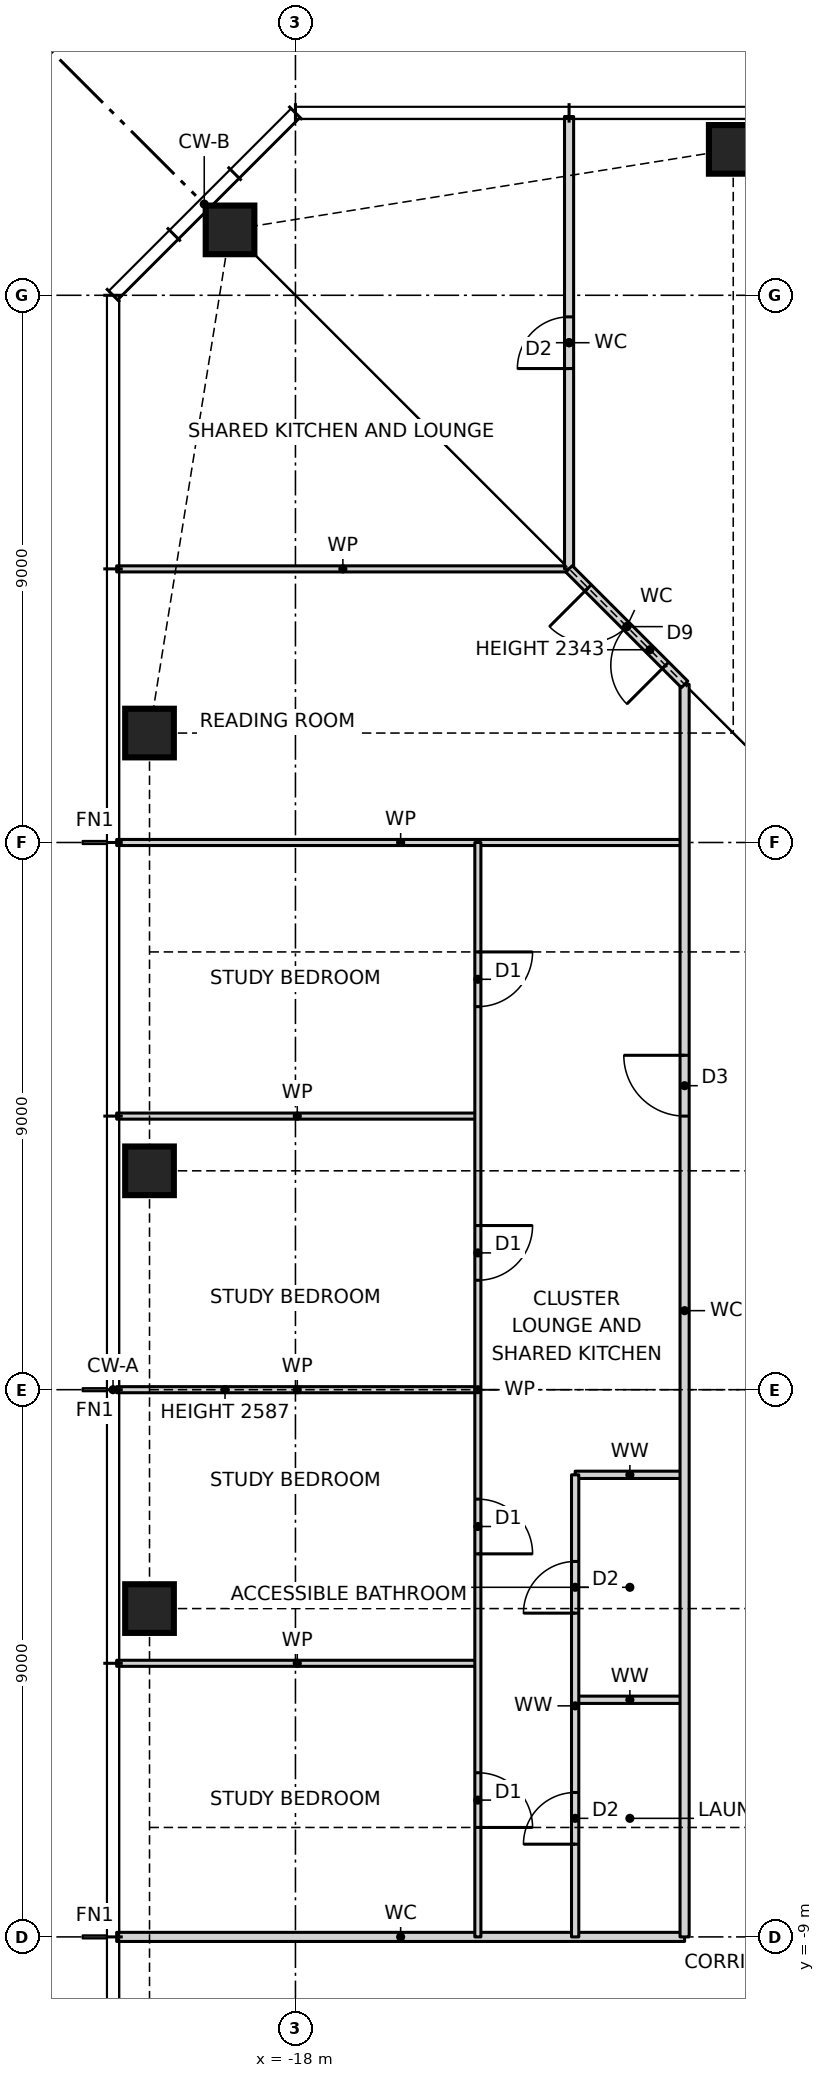
"""IFC4 building model, lengths in metres.
Left out: names, types, materials, properties, quantities, classifications, styles, units other than length and angle.
Written with IfcOpenShell. Run it as: python <this file> out.ifc"""

import sys

from ifc_helpers import new_model, si_unit, direction, frame, frame_2d, origin, origin_2d, place, context, subcontext, project, spatial, rectangle, hollow_rectangle, extrude, element, fill, save


model = new_model("IFC4")
c1 = context("Model", 3, precision=1e-05, world=origin(), true_north=direction((0.0, 1.0)))
c2 = subcontext(c1, "Body", "Model", "MODEL_VIEW")
j1 = project(units=[si_unit("LENGTHUNIT", "METRE"), si_unit("PLANEANGLEUNIT", "RADIAN")], contexts=[c1])
p1 = place(None, origin())
s1 = spatial("IfcSite", under=j1, at=p1, CompositionType="ELEMENT")
p2 = place(p1, origin())
s2 = spatial("IfcBuilding", under=s1, at=p2, CompositionType="ELEMENT")
p3 = place(p2, frame((0.0, 0.0, 136.5)))
s3 = spatial("IfcBuildingStorey", under=s2, at=p3, CompositionType="ELEMENT", Elevation=136.5)
for number, where, z_axis, x_axis in (
    (1, (-10.8, 20.4, 0.0), (0.0, 0.0, 1.0), (1.0, 0.0, 0.0)),
    (2, (-19.076, 19.076, 0.0), (0.0, 0.0, 1.0), (1.0, 0.0, 0.0)),
    (3, (-20.4, 10.8, 0.0), (0.0, 0.0, 1.0), (1.0, 0.0, 0.0)),
    (4, (-20.4, 3.6, 0.0), (0.0, 0.0, 1.0), (1.0, 0.0, 0.0)),
    (5, (-20.4, -3.6, 0.0), (0.0, 0.0, 1.0), (1.0, 0.0, 0.0)),
):
    element("IfcColumn", number, at=place(p3, frame(where, z_axis=z_axis, x_axis=x_axis)), inside=s3, PredefinedType="COLUMN", context=c2, shape_type="SweptSolid", body=[
        extrude(hollow_rectangle(XDim=0.8, YDim=0.8, WallThickness=0.07, at=origin_2d()), origin(), (0.0, 0.0, 1.0), 3.5),
    ])
p4 = place(p3, frame((-20.94, -9.0, 0.0), z_axis=(0.0, 0.0, 1.0), x_axis=(1.0, 0.0, 0.0)))
e6 = element("IfcWall", 6, at=p4, inside=s3, PredefinedType="PARTITIONING", context=c2, shape_type="SweptSolid", body=[
    extrude(rectangle(XDim=9.34, YDim=0.15, at=frame_2d((4.67, 0.0))), origin(), (0.0, 0.0, 1.0), 3.27),
])
p5 = place(p3, frame((-13.4, -5.1, 0.0), z_axis=(0.0, 0.0, 1.0), x_axis=(1.0, 0.0, 0.0)))
e7 = element("IfcWall", 7, at=p5, inside=s3, PredefinedType="PARTITIONING", context=c2, shape_type="SweptSolid", body=[
    extrude(rectangle(XDim=1.8, YDim=0.12, at=frame_2d((0.9, 0.0))), origin(), (0.0, 0.0, 1.0), 3.27),
])
p6 = place(p3, frame((-20.94, -4.5, 0.0), z_axis=(0.0, 0.0, 1.0), x_axis=(1.0, 0.0, 0.0)))
e8 = element("IfcWall", 8, at=p6, inside=s3, PredefinedType="PARTITIONING", context=c2, shape_type="SweptSolid", body=[
    extrude(rectangle(XDim=5.94, YDim=0.1, at=frame_2d((2.97, 0.0))), origin(), (0.0, 0.0, 1.0), 3.27),
])
p7 = place(p3, frame((-13.4, -1.4, 0.0), z_axis=(0.0, 0.0, 1.0), x_axis=(1.0, 0.0, 0.0)))
e9 = element("IfcWall", 9, at=p7, inside=s3, PredefinedType="PARTITIONING", context=c2, shape_type="SweptSolid", body=[
    extrude(rectangle(XDim=1.8, YDim=0.12, at=frame_2d((0.9, 0.0))), origin(), (0.0, 0.0, 1.0), 3.27),
])
p8 = place(p3, frame((-20.94, 0.0, 0.0), z_axis=(0.0, 0.0, 1.0), x_axis=(1.0, 0.0, 0.0)))
e10 = element("IfcWall", 10, at=p8, inside=s3, PredefinedType="PARTITIONING", context=c2, shape_type="SweptSolid", body=[
    extrude(rectangle(XDim=5.94, YDim=0.1, at=frame_2d((2.97, 0.0))), origin(), (0.0, 0.0, 1.0), 2.587),
])
p9 = place(p3, frame((-20.94, 4.5, 0.0), z_axis=(0.0, 0.0, 1.0), x_axis=(1.0, 0.0, 0.0)))
e11 = element("IfcWall", 11, at=p9, inside=s3, PredefinedType="PARTITIONING", context=c2, shape_type="SweptSolid", body=[
    extrude(rectangle(XDim=5.94, YDim=0.1, at=frame_2d((2.97, 0.0))), origin(), (0.0, 0.0, 1.0), 3.27),
])
p10 = place(p3, frame((-20.94, 9.0, 0.0), z_axis=(0.0, 0.0, 1.0), x_axis=(1.0, 0.0, 0.0)))
e12 = element("IfcWall", 12, at=p10, inside=s3, PredefinedType="PARTITIONING", context=c2, shape_type="SweptSolid", body=[
    extrude(rectangle(XDim=9.34, YDim=0.1, at=frame_2d((4.67, 0.0))), origin(), (0.0, 0.0, 1.0), 3.27),
])
p11 = place(p3, frame((-20.94, 13.5, 0.0), z_axis=(0.0, 0.0, 1.0), x_axis=(1.0, 0.0, 0.0)))
e13 = element("IfcWall", 13, at=p11, inside=s3, PredefinedType="PARTITIONING", context=c2, shape_type="SweptSolid", body=[
    extrude(rectangle(XDim=7.44, YDim=0.1, at=frame_2d((3.72, 0.0))), origin(), (0.0, 0.0, 1.0), 3.27),
])
p12 = place(p3, frame((-11.6, -9.0, 0.0), z_axis=(0.0, 0.0, 1.0), x_axis=(0.0, 1.0, 0.0)))
e14 = element("IfcWall", 14, at=p12, inside=s3, PredefinedType="PARTITIONING", context=c2, shape_type="SweptSolid", body=[
    extrude(rectangle(XDim=20.6, YDim=0.15, at=frame_2d((10.3, 0.0))), origin(), (0.0, 0.0, 1.0), 3.27),
])
p13 = place(p12, frame((13.5, 0.0, 0.0)))
e15 = element("IfcOpeningElement", 15, at=p13, cuts=e14, PredefinedType="OPENING", context=c2, shape_type="SweptSolid", body=[
    extrude(rectangle(XDim=1.0, YDim=2.1, at=frame_2d((0.5, 1.05))), frame((0.0, 0.085, 0.0), z_axis=(0.0, -1.0, 0.0), x_axis=(1.0, 0.0, 0.0)), (0.0, 0.0, 1.0), 0.17),
])
p14 = place(p3, frame((-13.4, -9.0, 0.0), z_axis=(0.0, 0.0, 1.0), x_axis=(0.0, 1.0, 0.0)))
e16 = element("IfcWall", 16, at=p14, inside=s3, PredefinedType="PARTITIONING", context=c2, shape_type="SweptSolid", body=[
    extrude(rectangle(XDim=7.6, YDim=0.12, at=frame_2d((3.8, 0.0))), origin(), (0.0, 0.0, 1.0), 3.27),
])
p15 = place(p14, frame((5.325, 0.0, 0.0)))
e17 = element("IfcOpeningElement", 17, at=p15, cuts=e16, PredefinedType="OPENING", context=c2, shape_type="SweptSolid", body=[
    extrude(rectangle(XDim=0.85, YDim=2.1, at=frame_2d((0.425, 1.05))), frame((0.0, 0.07, 0.0), z_axis=(0.0, -1.0, 0.0), x_axis=(1.0, 0.0, 0.0)), (0.0, 0.0, 1.0), 0.14),
])
p16 = place(p14, frame((1.525, 0.0, 0.0)))
e18 = element("IfcOpeningElement", 18, at=p16, cuts=e16, PredefinedType="OPENING", context=c2, shape_type="SweptSolid", body=[
    extrude(rectangle(XDim=0.85, YDim=2.1, at=frame_2d((0.425, 1.05))), frame((0.0, 0.07, 0.0), z_axis=(0.0, -1.0, 0.0), x_axis=(1.0, 0.0, 0.0)), (0.0, 0.0, 1.0), 0.14),
])
p17 = place(p3, frame((-13.5, 13.5, 0.0), z_axis=(0.0, 0.0, 1.0), x_axis=(0.0, 1.0, 0.0)))
e19 = element("IfcWall", 19, at=p17, inside=s3, PredefinedType="PARTITIONING", context=c2, shape_type="SweptSolid", body=[
    extrude(rectangle(XDim=7.44, YDim=0.15, at=frame_2d((3.72, 0.0))), origin(), (0.0, 0.0, 1.0), 3.27),
])
p18 = place(p17, frame((3.295, 0.0, 0.0)))
e20 = element("IfcOpeningElement", 20, at=p18, cuts=e19, PredefinedType="OPENING", context=c2, shape_type="SweptSolid", body=[
    extrude(rectangle(XDim=0.85, YDim=2.1, at=frame_2d((0.425, 1.05))), frame((0.0, 0.085, 0.0), z_axis=(0.0, -1.0, 0.0), x_axis=(1.0, 0.0, 0.0)), (0.0, 0.0, 1.0), 0.17),
])
p19 = place(p3, frame((-15.0, -9.0, 0.0), z_axis=(0.0, 0.0, 1.0), x_axis=(0.0, 1.0, 0.0)))
e21 = element("IfcWall", 21, at=p19, inside=s3, PredefinedType="PARTITIONING", context=c2, shape_type="SweptSolid", body=[
    extrude(rectangle(XDim=18.0, YDim=0.1, at=frame_2d((9.0, 0.0))), origin(), (0.0, 0.0, 1.0), 3.27),
])
p20 = place(p19, frame((15.3, 0.0, 0.0)))
e22 = element("IfcOpeningElement", 22, at=p20, cuts=e21, PredefinedType="OPENING", context=c2, shape_type="SweptSolid", body=[
    extrude(rectangle(XDim=0.9, YDim=2.1, at=frame_2d((0.45, 1.05))), frame((0.0, 0.06, 0.0), z_axis=(0.0, -1.0, 0.0), x_axis=(1.0, 0.0, 0.0)), (0.0, 0.0, 1.0), 0.12),
])
p21 = place(p19, frame((10.8, 0.0, 0.0)))
e23 = element("IfcOpeningElement", 23, at=p21, cuts=e21, PredefinedType="OPENING", context=c2, shape_type="SweptSolid", body=[
    extrude(rectangle(XDim=0.9, YDim=2.1, at=frame_2d((0.45, 1.05))), frame((0.0, 0.06, 0.0), z_axis=(0.0, -1.0, 0.0), x_axis=(1.0, 0.0, 0.0)), (0.0, 0.0, 1.0), 0.12),
])
p22 = place(p19, frame((6.3, 0.0, 0.0)))
e24 = element("IfcOpeningElement", 24, at=p22, cuts=e21, PredefinedType="OPENING", context=c2, shape_type="SweptSolid", body=[
    extrude(rectangle(XDim=0.9, YDim=2.1, at=frame_2d((0.45, 1.05))), frame((0.0, 0.06, 0.0), z_axis=(0.0, -1.0, 0.0), x_axis=(1.0, 0.0, 0.0)), (0.0, 0.0, 1.0), 0.12),
])
p23 = place(p19, frame((1.8, 0.0, 0.0)))
e25 = element("IfcOpeningElement", 25, at=p23, cuts=e21, PredefinedType="OPENING", context=c2, shape_type="SweptSolid", body=[
    extrude(rectangle(XDim=0.9, YDim=2.1, at=frame_2d((0.45, 1.05))), frame((0.0, 0.06, 0.0), z_axis=(0.0, -1.0, 0.0), x_axis=(1.0, 0.0, 0.0)), (0.0, 0.0, 1.0), 0.12),
])
p24 = place(p3, frame((-11.6, 11.6, 0.0), z_axis=(0.0, 0.0, 1.0), x_axis=(-0.707106781187, 0.707106781187, 0.0)))
e26 = element("IfcWall", 26, at=p24, inside=s3, PredefinedType="PARTITIONING", context=c2, shape_type="SweptSolid", body=[
    extrude(rectangle(XDim=2.687, YDim=0.15, at=frame_2d((1.343, 0.0))), origin(), (0.0, 0.0, 1.0), 2.343),
])
p25 = place(p24, frame((0.444, 0.0, 0.0)))
e27 = element("IfcOpeningElement", 27, at=p25, cuts=e26, PredefinedType="OPENING", context=c2, shape_type="SweptSolid", body=[
    extrude(rectangle(XDim=1.8, YDim=2.1, at=frame_2d((0.9, 1.05))), frame((0.0, 0.085, 0.0), z_axis=(0.0, -1.0, 0.0), x_axis=(1.0, 0.0, 0.0)), (0.0, 0.0, 1.0), 0.17),
])
p26 = place(p25, origin())
e28 = element("IfcDoor", 28, at=p26, inside=s3, OperationType="DOUBLE_DOOR_SINGLE_SWING", PredefinedType="DOOR", context=c2, shape_type="SweptSolid", body=[
    extrude(rectangle(XDim=1.8, YDim=2.1, at=frame_2d((0.9, 1.05))), frame((0.0, 0.025, 0.0), z_axis=(0.0, -1.0, 0.0), x_axis=(1.0, 0.0, 0.0)), (0.0, 0.0, 1.0), 0.05),
])
fill(e27, e28)
p27 = place(p20, frame((0.9, 0.0, 0.0), z_axis=(0.0, 0.0, 1.0), x_axis=(-1.0, 0.0, 0.0)))
e29 = element("IfcDoor", 29, at=p27, inside=s3, OperationType="SINGLE_SWING_LEFT", PredefinedType="DOOR", context=c2, shape_type="SweptSolid", body=[
    extrude(rectangle(XDim=0.9, YDim=2.1, at=frame_2d((0.45, 1.05))), frame((0.0, 0.025, 0.0), z_axis=(0.0, -1.0, 0.0), x_axis=(1.0, 0.0, 0.0)), (0.0, 0.0, 1.0), 0.05),
])
fill(e22, e29)
p28 = place(p21, frame((0.9, 0.0, 0.0), z_axis=(0.0, 0.0, 1.0), x_axis=(-1.0, 0.0, 0.0)))
e30 = element("IfcDoor", 30, at=p28, inside=s3, OperationType="SINGLE_SWING_LEFT", PredefinedType="DOOR", context=c2, shape_type="SweptSolid", body=[
    extrude(rectangle(XDim=0.9, YDim=2.1, at=frame_2d((0.45, 1.05))), frame((0.0, 0.025, 0.0), z_axis=(0.0, -1.0, 0.0), x_axis=(1.0, 0.0, 0.0)), (0.0, 0.0, 1.0), 0.05),
])
fill(e23, e30)
p29 = place(p22, frame((0.9, 0.0, 0.0), z_axis=(0.0, 0.0, 1.0), x_axis=(-1.0, 0.0, 0.0)))
e31 = element("IfcDoor", 31, at=p29, inside=s3, OperationType="SINGLE_SWING_RIGHT", PredefinedType="DOOR", context=c2, shape_type="SweptSolid", body=[
    extrude(rectangle(XDim=0.9, YDim=2.1, at=frame_2d((0.45, 1.05))), frame((0.0, 0.025, 0.0), z_axis=(0.0, -1.0, 0.0), x_axis=(1.0, 0.0, 0.0)), (0.0, 0.0, 1.0), 0.05),
])
fill(e24, e31)
p30 = place(p23, frame((0.9, 0.0, 0.0), z_axis=(0.0, 0.0, 1.0), x_axis=(-1.0, 0.0, 0.0)))
e32 = element("IfcDoor", 32, at=p30, inside=s3, OperationType="SINGLE_SWING_RIGHT", PredefinedType="DOOR", context=c2, shape_type="SweptSolid", body=[
    extrude(rectangle(XDim=0.9, YDim=2.1, at=frame_2d((0.45, 1.05))), frame((0.0, 0.025, 0.0), z_axis=(0.0, -1.0, 0.0), x_axis=(1.0, 0.0, 0.0)), (0.0, 0.0, 1.0), 0.05),
])
fill(e25, e32)
p31 = place(p13, origin())
e33 = element("IfcDoor", 33, at=p31, inside=s3, OperationType="SINGLE_SWING_RIGHT", PredefinedType="DOOR", context=c2, shape_type="SweptSolid", body=[
    extrude(rectangle(XDim=1.0, YDim=2.1, at=frame_2d((0.5, 1.05))), frame((0.0, 0.025, 0.0), z_axis=(0.0, -1.0, 0.0), x_axis=(1.0, 0.0, 0.0)), (0.0, 0.0, 1.0), 0.05),
])
fill(e15, e33)
p32 = place(p15, origin())
e34 = element("IfcDoor", 34, at=p32, inside=s3, OperationType="SINGLE_SWING_LEFT", PredefinedType="DOOR", context=c2, shape_type="SweptSolid", body=[
    extrude(rectangle(XDim=0.85, YDim=2.1, at=frame_2d((0.425, 1.05))), frame((0.0, 0.025, 0.0), z_axis=(0.0, -1.0, 0.0), x_axis=(1.0, 0.0, 0.0)), (0.0, 0.0, 1.0), 0.05),
])
fill(e17, e34)
p33 = place(p16, origin())
e35 = element("IfcDoor", 35, at=p33, inside=s3, OperationType="SINGLE_SWING_LEFT", PredefinedType="DOOR", context=c2, shape_type="SweptSolid", body=[
    extrude(rectangle(XDim=0.85, YDim=2.1, at=frame_2d((0.425, 1.05))), frame((0.0, 0.025, 0.0), z_axis=(0.0, -1.0, 0.0), x_axis=(1.0, 0.0, 0.0)), (0.0, 0.0, 1.0), 0.05),
])
fill(e18, e35)
p34 = place(p18, origin())
e36 = element("IfcDoor", 36, at=p34, inside=s3, OperationType="SINGLE_SWING_LEFT", PredefinedType="DOOR", context=c2, shape_type="SweptSolid", body=[
    extrude(rectangle(XDim=0.85, YDim=2.1, at=frame_2d((0.425, 1.05))), frame((0.0, 0.025, 0.0), z_axis=(0.0, -1.0, 0.0), x_axis=(1.0, 0.0, 0.0)), (0.0, 0.0, 1.0), 0.05),
])
fill(e20, e36)
save(model, sys.argv[1])
